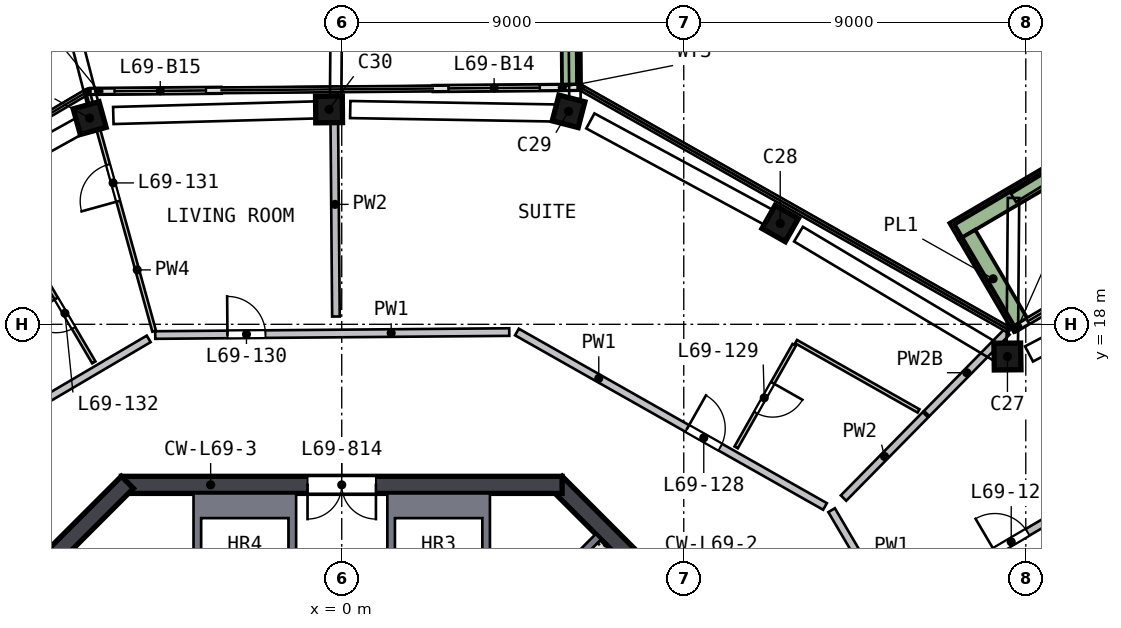
"""IFC4 building model, lengths in metres.
Left out: names, types, materials, properties, quantities, classifications, styles, units other than length and angle.
Written with IfcOpenShell. Run it as: python <this file> out.ifc"""

import sys

from ifc_helpers import new_model, si_unit, direction, frame, frame_2d, origin, origin_2d, place, context, subcontext, project, spatial, polyline, rectangle, outline, extrude, element, fill, save


model = new_model("IFC4")
c1 = context("Model", 3, precision=1e-05, world=origin(), true_north=direction((0.0, 1.0)))
c2 = subcontext(c1, "Body", "Model", "MODEL_VIEW")
j1 = project(units=[si_unit("LENGTHUNIT", "METRE"), si_unit("PLANEANGLEUNIT", "RADIAN")], contexts=[c1])
p1 = place(None, origin())
s1 = spatial("IfcSite", under=j1, at=p1, CompositionType="ELEMENT")
p2 = place(p1, origin())
s2 = spatial("IfcBuilding", under=s1, at=p2, CompositionType="ELEMENT")
p3 = place(p2, frame((0.0, 0.0, 281.0)))
s3 = spatial("IfcBuildingStorey", under=s2, at=p3, CompositionType="ELEMENT", Elevation=281.0)
p4 = place(p3, frame((17.616, 17.052, 0.0), z_axis=(-0.081789563, 0.083081777, 0.993180691), x_axis=(0.996614216, 0.015217444, 0.080799344)))
e1 = element("IfcColumn", 1, at=p4, inside=s3, PredefinedType="COLUMN", context=c2, shape_type="SweptSolid", body=[
    extrude(rectangle(XDim=0.7, YDim=0.7, at=origin_2d()), origin(), (0.0, 0.0, 1.0), 3.212),
])
p5 = place(p3, frame((11.657, 20.587, 0.0), z_axis=(-0.098331196, 0.054603093, 0.993654607), x_axis=(-0.864581294, 0.489744386, -0.112470541)))
e2 = element("IfcColumn", 2, at=p5, inside=s3, PredefinedType="COLUMN", context=c2, shape_type="SweptSolid", body=[
    extrude(rectangle(XDim=0.7, YDim=0.7, at=origin_2d()), origin(), (0.0, 0.0, 1.0), 3.21),
])
p6 = place(p3, frame((6.104, 23.57, 0.0), z_axis=(-0.112281885, 0.028051466, 0.99328037), x_axis=(0.96158352, -0.248925653, 0.115728794)))
e3 = element("IfcColumn", 3, at=p6, inside=s3, PredefinedType="COLUMN", context=c2, shape_type="SweptSolid", body=[
    extrude(rectangle(XDim=0.7, YDim=0.7, at=origin_2d()), origin(), (0.0, 0.0, 1.0), 3.211),
])
p7 = place(p3, frame((-0.198, 23.657, 0.0), z_axis=(-0.112476061, -0.001901218, 0.993652616), x_axis=(-0.993617878, -0.008362644, -0.11248813)))
e4 = element("IfcColumn", 4, at=p7, inside=s3, PredefinedType="COLUMN", context=c2, shape_type="SweptSolid", body=[
    extrude(rectangle(XDim=0.7, YDim=0.7, at=origin_2d()), origin(), (0.0, 0.0, 1.0), 3.21),
])
p8 = place(p3, frame((-6.499, 23.465, 0.0), z_axis=(-0.111293516, -0.031776427, 0.993279423), x_axis=(0.95739256, 0.264583542, 0.115736922)))
e5 = element("IfcColumn", 5, at=p8, inside=s3, PredefinedType="COLUMN", context=c2, shape_type="SweptSolid", body=[
    extrude(rectangle(XDim=0.7, YDim=0.7, at=origin_2d()), origin(), (0.0, 0.0, 1.0), 3.211),
])
p9 = place(p3, frame((13.841, 5.64, 0.0), z_axis=(0.0, 0.0, 1.0), x_axis=(-0.707106781, 0.707106781, 0.0)))
e6 = element("IfcWall", 6, at=p9, inside=s3, PredefinedType="SHEAR", context=c2, shape_type="SweptSolid", body=[
    extrude(rectangle(XDim=11.598, YDim=0.45, at=frame_2d((5.799, 0.0))), origin(), (0.0, 0.0, 1.0), 3.5),
])
p10 = place(p9, frame((2.099, 0.0, 0.0)))
e7 = element("IfcOpeningElement", 7, at=p10, cuts=e6, PredefinedType="OPENING", context=c2, shape_type="SweptSolid", body=[
    extrude(rectangle(XDim=1.2, YDim=2.1, at=frame_2d((0.6, 1.05))), frame((0.0, 0.235, 0.0), z_axis=(0.0, -1.0, 0.0), x_axis=(1.0, 0.0, 0.0)), (0.0, 0.0, 1.0), 0.47),
])
p11 = place(p3, frame((5.799, 13.775, 0.0), z_axis=(0.0, 0.0, 1.0), x_axis=(-1.0, 0.0, 0.0)))
e8 = element("IfcWall", 8, at=p11, inside=s3, PredefinedType="SHEAR", context=c2, shape_type="SweptSolid", body=[
    extrude(rectangle(XDim=11.598, YDim=0.45, at=frame_2d((5.799, 0.0))), origin(), (0.0, 0.0, 1.0), 3.5),
])
p12 = place(p11, frame((4.899, 0.0, 0.0)))
e9 = element("IfcOpeningElement", 9, at=p12, cuts=e8, PredefinedType="OPENING", context=c2, shape_type="SweptSolid", body=[
    extrude(rectangle(XDim=1.8, YDim=2.1, at=frame_2d((0.9, 1.05))), frame((0.0, 0.235, 0.0), z_axis=(0.0, -1.0, 0.0), x_axis=(1.0, 0.0, 0.0)), (0.0, 0.0, 1.0), 0.47),
])
p13 = place(p3, frame((-5.64, 13.841, 0.0), z_axis=(0.0, 0.0, 1.0), x_axis=(-0.707106781, -0.707106781, 0.0)))
e10 = element("IfcWall", 10, at=p13, inside=s3, PredefinedType="SHEAR", context=c2, shape_type="SweptSolid", body=[
    extrude(rectangle(XDim=11.598, YDim=0.45, at=frame_2d((5.799, 0.0))), origin(), (0.0, 0.0, 1.0), 3.5),
])
p14 = place(p3, frame((20.465, 19.5, 0.0), z_axis=(0.0, 0.0, 1.0), x_axis=(-0.861824362, -0.507206831, 0.0)))
e11 = element("IfcWall", 11, at=p14, inside=s3, PredefinedType="SOLIDWALL", context=c2, shape_type="SweptSolid", body=[
    extrude(rectangle(XDim=3.2, YDim=0.15, at=frame_2d((1.6, 0.0))), origin(), (0.0, 0.0, 1.0), 2.525),
])
p15 = place(p14, frame((0.4, 0.0, 0.0)))
e12 = element("IfcOpeningElement", 12, at=p15, cuts=e11, PredefinedType="OPENING", context=c2, shape_type="SweptSolid", body=[
    extrude(rectangle(XDim=2.4, YDim=2.4, at=frame_2d((1.2, 1.2))), frame((0.0, 0.085, 0.0), z_axis=(0.0, -1.0, 0.0), x_axis=(1.0, 0.0, 0.0)), (0.0, 0.0, 1.0), 0.17),
])
p16 = place(p3, frame((6.197, 24.236, 0.0), z_axis=(0.0, 0.0, 1.0), x_axis=(-0.999964875, -0.008381395, 0.0)))
e13 = element("IfcWall", 13, at=p16, inside=s3, PredefinedType="SOLIDWALL", context=c2, shape_type="SweptSolid", body=[
    extrude(rectangle(XDim=3.787, YDim=0.15, at=frame_2d((1.894, 0.0))), origin(), (0.0, 0.0, 1.0), 2.525),
])
p17 = place(p16, frame((0.987, 0.0, 0.0)))
e14 = element("IfcOpeningElement", 14, at=p17, cuts=e13, PredefinedType="OPENING", context=c2, shape_type="SweptSolid", body=[
    extrude(rectangle(XDim=2.4, YDim=2.4, at=frame_2d((1.2, 1.2))), frame((0.0, 0.085, 0.0), z_axis=(0.0, -1.0, 0.0), x_axis=(1.0, 0.0, 0.0)), (0.0, 0.0, 1.0), 0.17),
])
p18 = place(p3, frame((-3.176, 24.157, 0.0), z_axis=(0.0, 0.0, 1.0), x_axis=(-0.99996526, -0.008335419, 0.0)))
e15 = element("IfcWall", 15, at=p18, inside=s3, PredefinedType="SOLIDWALL", context=c2, shape_type="SweptSolid", body=[
    extrude(rectangle(XDim=3.427, YDim=0.15, at=frame_2d((1.713, 0.0))), origin(), (0.0, 0.0, 1.0), 2.525),
])
p19 = place(p18, frame((0.4, 0.0, 0.0)))
e16 = element("IfcOpeningElement", 16, at=p19, cuts=e15, PredefinedType="OPENING", context=c2, shape_type="SweptSolid", body=[
    extrude(rectangle(XDim=2.4, YDim=2.4, at=frame_2d((1.2, 1.2))), frame((0.0, 0.085, 0.0), z_axis=(0.0, -1.0, 0.0), x_axis=(1.0, 0.0, 0.0)), (0.0, 0.0, 1.0), 0.17),
])
p20 = place(p3, frame((28.316, 27.631, 0.0), z_axis=(0.0, 0.0, 1.0), x_axis=(-0.861805653, -0.507238618, 0.0)))
e17 = element("IfcWall", 17, at=p20, inside=s3, PredefinedType="SOLIDWALL", context=c2, shape_type="SweptSolid", body=[
    extrude(rectangle(XDim=14.16, YDim=0.5, at=frame_2d((7.08, 0.0))), origin(), (0.0, 0.0, 1.0), 0.7),
])
p21 = place(p3, frame((16.455, 20.36, 0.0), z_axis=(0.0, 0.0, 1.0), x_axis=(0.507281009, -0.861780702, 0.0)))
e18 = element("IfcWall", 18, at=p21, inside=s3, PredefinedType="SOLIDWALL", context=c2, shape_type="SweptSolid", body=[
    extrude(rectangle(XDim=2.699, YDim=0.5, at=frame_2d((1.35, 0.0))), origin(), (0.0, 0.0, 1.0), 0.7),
])
p22 = place(p3, frame((6.047, 24.311, 0.0), z_axis=(0.0, 0.0, 1.0), x_axis=(-0.008394728, 0.999964764, 0.0)))
e19 = element("IfcWall", 19, at=p22, inside=s3, PredefinedType="SOLIDWALL", context=c2, shape_type="SweptSolid", body=[
    extrude(rectangle(XDim=3.199, YDim=0.5, at=frame_2d((1.6, 0.0))), origin(), (0.0, 0.0, 1.0), 0.7),
])
p23 = place(p3, frame((-7.576, 27.112, 0.0), z_axis=(0.0, 0.0, 1.0), x_axis=(-0.86180888, -0.507233136, 0.0)))
e20 = element("IfcWall", 20, at=p23, inside=s3, PredefinedType="SOLIDWALL", context=c2, shape_type="SweptSolid", body=[
    extrude(rectangle(XDim=13.723, YDim=0.5, at=frame_2d((6.862, 0.0))), origin(), (0.0, 0.0, 1.0), 0.7),
])
p24 = place(p3, origin())
e21 = element("IfcWall", 21, at=p24, inside=s3, PredefinedType="SOLIDWALL", context=c2, shape_type="SweptSolid", body=[
    extrude(outline(polyline([(3.9, 9.9), (3.7, 9.9), (3.7, 12.9), (1.4, 12.9), (1.4, 9.9), (1.2, 9.9), (1.2, 13.55), (3.9, 13.55), (3.9, 9.9)])), origin(), (0.0, 0.0, 1.0), 3.19),
])
p25 = place(p3, origin())
e22 = element("IfcWall", 22, at=p25, inside=s3, PredefinedType="SOLIDWALL", context=c2, shape_type="SweptSolid", body=[
    extrude(outline(polyline([(-3.9, 13.55), (-1.2, 13.55), (-1.2, 9.9), (-1.4, 9.9), (-1.4, 12.9), (-3.7, 12.9), (-3.7, 9.9), (-3.9, 9.9), (-3.9, 13.55)])), origin(), (0.0, 0.0, 1.0), 3.19),
])
p26 = place(p3, frame((3.677, 9.334, 0.0), z_axis=(0.0, 0.0, 1.0), x_axis=(0.707106781, 0.707106781, 0.0)))
e23 = element("IfcWall", 23, at=p26, inside=s3, PredefinedType="SOLIDWALL", context=c2, shape_type="SweptSolid", body=[
    extrude(rectangle(XDim=4.35, YDim=0.2, at=frame_2d((2.175, 0.0))), origin(), (0.0, 0.0, 1.0), 3.19),
])
p27 = place(p3, frame((-12.936, 12.992, 0.0), z_axis=(0.0, 0.0, 1.0), x_axis=(0.861805451, 0.507238962, 0.0)))
e24 = element("IfcWall", 24, at=p27, inside=s3, PredefinedType="SOLIDWALL", context=c2, shape_type="SweptSolid", body=[
    extrude(rectangle(XDim=9.116, YDim=0.2, at=frame_2d((4.558, 0.0))), origin(), (0.0, 0.0, 1.0), 3.19),
])
p28 = place(p27, frame((3.05, 0.0, 0.0)))
e25 = element("IfcOpeningElement", 25, at=p28, cuts=e24, PredefinedType="OPENING", context=c2, shape_type="SweptSolid", body=[
    extrude(rectangle(XDim=1.0, YDim=2.1, at=frame_2d((0.5, 1.05))), frame((0.0, 0.11, 0.0), z_axis=(0.0, -1.0, 0.0), x_axis=(1.0, 0.0, 0.0)), (0.0, 0.0, 1.0), 0.22),
])
p29 = place(p3, frame((-4.907, 17.718, 0.0), z_axis=(0.0, 0.0, 1.0), x_axis=(0.999964838, 0.008385889, 0.0)))
e26 = element("IfcWall", 26, at=p29, inside=s3, PredefinedType="SOLIDWALL", context=c2, shape_type="SweptSolid", body=[
    extrude(rectangle(XDim=9.316, YDim=0.2, at=frame_2d((4.658, 0.0))), origin(), (0.0, 0.0, 1.0), 3.19),
])
p30 = place(p29, frame((1.9, 0.0, 0.0)))
e27 = element("IfcOpeningElement", 27, at=p30, cuts=e26, PredefinedType="OPENING", context=c2, shape_type="SweptSolid", body=[
    extrude(rectangle(XDim=1.0, YDim=2.1, at=frame_2d((0.5, 1.05))), frame((0.0, 0.11, 0.0), z_axis=(0.0, -1.0, 0.0), x_axis=(1.0, 0.0, 0.0)), (0.0, 0.0, 1.0), 0.22),
])
p31 = place(p3, frame((4.61, 17.797, 0.0), z_axis=(0.0, 0.0, 1.0), x_axis=(0.870181384, -0.492731528, 0.0)))
e28 = element("IfcWall", 28, at=p31, inside=s3, PredefinedType="SOLIDWALL", context=c2, shape_type="SweptSolid", body=[
    extrude(rectangle(XDim=9.316, YDim=0.2, at=frame_2d((4.658, 0.0))), origin(), (0.0, 0.0, 1.0), 3.19),
])
p32 = place(p31, frame((5.15, 0.0, 0.0)))
e29 = element("IfcOpeningElement", 29, at=p32, cuts=e28, PredefinedType="OPENING", context=c2, shape_type="SweptSolid", body=[
    extrude(rectangle(XDim=1.0, YDim=2.1, at=frame_2d((0.5, 1.05))), frame((0.0, 0.11, 0.0), z_axis=(0.0, -1.0, 0.0), x_axis=(1.0, 0.0, 0.0)), (0.0, 0.0, 1.0), 0.22),
])
p33 = place(p3, frame((12.891, 13.108, 0.0), z_axis=(0.0, 0.0, 1.0), x_axis=(0.507237612, -0.861806246, 0.0)))
e30 = element("IfcWall", 30, at=p33, inside=s3, PredefinedType="SOLIDWALL", context=c2, shape_type="SweptSolid", body=[
    extrude(rectangle(XDim=9.517, YDim=0.2, at=frame_2d((4.758, 0.0))), origin(), (0.0, 0.0, 1.0), 3.19),
])
p34 = place(p33, frame((3.866, 0.0, 0.0)))
e31 = element("IfcOpeningElement", 31, at=p34, cuts=e30, PredefinedType="OPENING", context=c2, shape_type="SweptSolid", body=[
    extrude(rectangle(XDim=1.8, YDim=2.1, at=frame_2d((0.9, 1.05))), frame((0.0, 0.11, 0.0), z_axis=(0.0, -1.0, 0.0), x_axis=(1.0, 0.0, 0.0)), (0.0, 0.0, 1.0), 0.22),
])
p35 = place(p3, frame((-0.153, 18.205, 0.0), z_axis=(0.0, 0.0, 1.0), x_axis=(-0.008355102, 0.999965096, 0.0)))
e32 = element("IfcWall", 32, at=p35, inside=s3, PredefinedType="SOLIDWALL", context=c2, shape_type="SweptSolid", body=[
    extrude(rectangle(XDim=5.903, YDim=0.2, at=frame_2d((2.951, 0.0))), origin(), (0.0, 0.0, 1.0), 3.19),
])
p36 = place(p3, frame((13.204, 13.427, 0.0), z_axis=(0.0, 0.0, 1.0), x_axis=(0.701166862, 0.712997217, 0.0)))
e33 = element("IfcWall", 33, at=p36, inside=s3, PredefinedType="SOLIDWALL", context=c2, shape_type="SweptSolid", body=[
    extrude(rectangle(XDim=3.075, YDim=0.2, at=frame_2d((1.538, 0.0))), origin(), (0.0, 0.0, 1.0), 3.19),
])
p37 = place(p3, frame((15.392, 15.652, 0.0), z_axis=(0.0, 0.0, 1.0), x_axis=(0.701163994, 0.713000038, 0.0)))
e34 = element("IfcWall", 34, at=p37, inside=s3, PredefinedType="SOLIDWALL", context=c2, shape_type="SweptSolid", body=[
    extrude(rectangle(XDim=3.011, YDim=0.2, at=frame_2d((1.506, 0.0))), origin(), (0.0, 0.0, 1.0), 2.69),
])
p38 = place(p3, frame((14.644, 10.524, 0.0), z_axis=(0.0, 0.0, 1.0), x_axis=(0.861805628, 0.507238661, 0.0)))
e35 = element("IfcWall", 35, at=p38, inside=s3, PredefinedType="SOLIDWALL", context=c2, shape_type="SweptSolid", body=[
    extrude(rectangle(XDim=10.252, YDim=0.2, at=frame_2d((5.126, 0.0))), origin(), (0.0, 0.0, 1.0), 3.19),
])
p39 = place(p38, frame((2.95, 0.0, 0.0)))
e36 = element("IfcOpeningElement", 36, at=p39, cuts=e35, PredefinedType="OPENING", context=c2, shape_type="SweptSolid", body=[
    extrude(rectangle(XDim=1.0, YDim=2.1, at=frame_2d((0.5, 1.05))), frame((0.0, 0.11, 0.0), z_axis=(0.0, -1.0, 0.0), x_axis=(1.0, 0.0, 0.0)), (0.0, 0.0, 1.0), 0.22),
])
p40 = place(p3, frame((25.199, 12.802, 0.0), z_axis=(0.0, 0.0, 1.0), x_axis=(-0.861805628, -0.507238661, 0.0)))
e37 = element("IfcWall", 37, at=p40, inside=s3, PredefinedType="SOLIDWALL", context=c2, shape_type="SweptSolid", body=[
    extrude(rectangle(XDim=10.252, YDim=0.2, at=frame_2d((5.126, 0.0))), origin(), (0.0, 0.0, 1.0), 3.19),
])
p41 = place(p40, frame((2.45, 0.0, 0.0)))
e38 = element("IfcOpeningElement", 38, at=p41, cuts=e37, PredefinedType="OPENING", context=c2, shape_type="SweptSolid", body=[
    extrude(rectangle(XDim=1.0, YDim=2.1, at=frame_2d((0.5, 1.05))), frame((0.0, 0.11, 0.0), z_axis=(0.0, -1.0, 0.0), x_axis=(1.0, 0.0, 0.0)), (0.0, 0.0, 1.0), 0.22),
])
p42 = place(p3, frame((-6.524, 16.998, 0.0), z_axis=(0.0, 0.0, 1.0), x_axis=(-0.507263495, 0.861791011, 0.0)))
e39 = element("IfcWall", 39, at=p42, inside=s3, PredefinedType="PARTITIONING", context=c2, shape_type="SweptSolid", body=[
    extrude(rectangle(XDim=3.2, YDim=0.1, at=frame_2d((1.6, 0.0))), origin(), (0.0, 0.0, 1.0), 3.19),
])
p43 = place(p42, frame((1.05, 0.0, 0.0)))
e40 = element("IfcOpeningElement", 40, at=p43, cuts=e39, PredefinedType="OPENING", context=c2, shape_type="SweptSolid", body=[
    extrude(rectangle(XDim=0.9, YDim=2.1, at=frame_2d((0.45, 1.05))), frame((0.0, 0.06, 0.0), z_axis=(0.0, -1.0, 0.0), x_axis=(1.0, 0.0, 0.0)), (0.0, 0.0, 1.0), 0.12),
])
p44 = place(p3, frame((-4.935, 17.818, 0.0), z_axis=(0.0, 0.0, 1.0), x_axis=(-0.266914636, 0.963720176, 0.0)))
e41 = element("IfcWall", 41, at=p44, inside=s3, PredefinedType="PARTITIONING", context=c2, shape_type="SweptSolid", body=[
    extrude(rectangle(XDim=6.476, YDim=0.1, at=frame_2d((3.238, 0.0))), origin(), (0.0, 0.0, 1.0), 3.19),
])
p45 = place(p44, frame((3.55, 0.0, 0.0)))
e42 = element("IfcOpeningElement", 42, at=p45, cuts=e41, PredefinedType="OPENING", context=c2, shape_type="SweptSolid", body=[
    extrude(rectangle(XDim=1.0, YDim=2.1, at=frame_2d((0.5, 1.05))), frame((0.0, 0.06, 0.0), z_axis=(0.0, -1.0, 0.0), x_axis=(1.0, 0.0, 0.0)), (0.0, 0.0, 1.0), 0.12),
])
p46 = place(p3, frame((11.906, 17.458, 0.0), z_axis=(0.0, 0.0, 1.0), x_axis=(-0.492708506, -0.870194419, 0.0)))
e43 = element("IfcWall", 43, at=p46, inside=s3, PredefinedType="PARTITIONING", context=c2, shape_type="SweptSolid", body=[
    extrude(rectangle(XDim=3.1, YDim=0.1, at=frame_2d((1.55, 0.0))), origin(), (0.0, 0.0, 1.0), 3.19),
])
p47 = place(p46, frame((1.15, 0.0, 0.0)))
e44 = element("IfcOpeningElement", 44, at=p47, cuts=e43, PredefinedType="OPENING", context=c2, shape_type="SweptSolid", body=[
    extrude(rectangle(XDim=0.9, YDim=2.1, at=frame_2d((0.45, 1.05))), frame((0.0, 0.06, 0.0), z_axis=(0.0, -1.0, 0.0), x_axis=(1.0, 0.0, 0.0)), (0.0, 0.0, 1.0), 0.12),
])
p48 = place(p3, frame((11.955, 17.545, 0.0), z_axis=(0.0, 0.0, 1.0), x_axis=(0.870167276, -0.492756443, 0.0)))
e45 = element("IfcWall", 45, at=p48, inside=s3, PredefinedType="PARTITIONING", context=c2, shape_type="SweptSolid", body=[
    extrude(rectangle(XDim=3.704, YDim=0.1, at=frame_2d((1.852, 0.0))), origin(), (0.0, 0.0, 1.0), 3.19),
])
p49 = place(p15, origin())
e46 = element("IfcDoor", 46, at=p49, inside=s3, OperationType="SLIDING_TO_RIGHT", PredefinedType="DOOR", context=c2, shape_type="SweptSolid", body=[
    extrude(rectangle(XDim=2.4, YDim=2.4, at=frame_2d((1.2, 1.2))), frame((0.0, 0.025, 0.0), z_axis=(0.0, -1.0, 0.0), x_axis=(1.0, 0.0, 0.0)), (0.0, 0.0, 1.0), 0.05),
])
fill(e12, e46)
p50 = place(p17, origin())
e47 = element("IfcDoor", 47, at=p50, inside=s3, OperationType="SLIDING_TO_LEFT", PredefinedType="DOOR", context=c2, shape_type="SweptSolid", body=[
    extrude(rectangle(XDim=2.4, YDim=2.4, at=frame_2d((1.2, 1.2))), frame((0.0, 0.025, 0.0), z_axis=(0.0, -1.0, 0.0), x_axis=(1.0, 0.0, 0.0)), (0.0, 0.0, 1.0), 0.05),
])
fill(e14, e47)
p51 = place(p19, origin())
e48 = element("IfcDoor", 48, at=p51, inside=s3, OperationType="SLIDING_TO_RIGHT", PredefinedType="DOOR", context=c2, shape_type="SweptSolid", body=[
    extrude(rectangle(XDim=2.4, YDim=2.4, at=frame_2d((1.2, 1.2))), frame((0.0, 0.025, 0.0), z_axis=(0.0, -1.0, 0.0), x_axis=(1.0, 0.0, 0.0)), (0.0, 0.0, 1.0), 0.05),
])
fill(e16, e48)
p52 = place(p12, origin())
e49 = element("IfcDoor", 49, at=p52, inside=s3, OperationType="DOUBLE_DOOR_SINGLE_SWING", PredefinedType="DOOR", context=c2, shape_type="SweptSolid", body=[
    extrude(rectangle(XDim=1.8, YDim=2.1, at=frame_2d((0.9, 1.05))), frame((0.0, 0.025, 0.0), z_axis=(0.0, -1.0, 0.0), x_axis=(1.0, 0.0, 0.0)), (0.0, 0.0, 1.0), 0.05),
])
fill(e9, e49)
p53 = place(p39, origin())
e50 = element("IfcDoor", 50, at=p53, inside=s3, OperationType="SINGLE_SWING_LEFT", PredefinedType="DOOR", context=c2, shape_type="SweptSolid", body=[
    extrude(rectangle(XDim=1.0, YDim=2.1, at=frame_2d((0.5, 1.05))), frame((0.0, 0.025, 0.0), z_axis=(0.0, -1.0, 0.0), x_axis=(1.0, 0.0, 0.0)), (0.0, 0.0, 1.0), 0.05),
])
fill(e36, e50)
p54 = place(p32, origin())
e51 = element("IfcDoor", 51, at=p54, inside=s3, OperationType="SINGLE_SWING_LEFT", PredefinedType="DOOR", context=c2, shape_type="SweptSolid", body=[
    extrude(rectangle(XDim=1.0, YDim=2.1, at=frame_2d((0.5, 1.05))), frame((0.0, 0.025, 0.0), z_axis=(0.0, -1.0, 0.0), x_axis=(1.0, 0.0, 0.0)), (0.0, 0.0, 1.0), 0.05),
])
fill(e29, e51)
p55 = place(p47, origin())
e52 = element("IfcDoor", 52, at=p55, inside=s3, OperationType="SINGLE_SWING_LEFT", PredefinedType="DOOR", context=c2, shape_type="SweptSolid", body=[
    extrude(rectangle(XDim=0.9, YDim=2.1, at=frame_2d((0.45, 1.05))), frame((0.0, 0.025, 0.0), z_axis=(0.0, -1.0, 0.0), x_axis=(1.0, 0.0, 0.0)), (0.0, 0.0, 1.0), 0.05),
])
fill(e44, e52)
p56 = place(p30, origin())
e53 = element("IfcDoor", 53, at=p56, inside=s3, OperationType="SINGLE_SWING_LEFT", PredefinedType="DOOR", context=c2, shape_type="SweptSolid", body=[
    extrude(rectangle(XDim=1.0, YDim=2.1, at=frame_2d((0.5, 1.05))), frame((0.0, 0.025, 0.0), z_axis=(0.0, -1.0, 0.0), x_axis=(1.0, 0.0, 0.0)), (0.0, 0.0, 1.0), 0.05),
])
fill(e27, e53)
p57 = place(p45, origin())
e54 = element("IfcDoor", 54, at=p57, inside=s3, OperationType="SINGLE_SWING_LEFT", PredefinedType="DOOR", context=c2, shape_type="SweptSolid", body=[
    extrude(rectangle(XDim=1.0, YDim=2.1, at=frame_2d((0.5, 1.05))), frame((0.0, 0.025, 0.0), z_axis=(0.0, -1.0, 0.0), x_axis=(1.0, 0.0, 0.0)), (0.0, 0.0, 1.0), 0.05),
])
fill(e42, e54)
p58 = place(p43, origin())
e55 = element("IfcDoor", 55, at=p58, inside=s3, OperationType="SINGLE_SWING_RIGHT", PredefinedType="DOOR", context=c2, shape_type="SweptSolid", body=[
    extrude(rectangle(XDim=0.9, YDim=2.1, at=frame_2d((0.45, 1.05))), frame((0.0, 0.025, 0.0), z_axis=(0.0, -1.0, 0.0), x_axis=(1.0, 0.0, 0.0)), (0.0, 0.0, 1.0), 0.05),
])
fill(e40, e55)
save(model, sys.argv[1])
